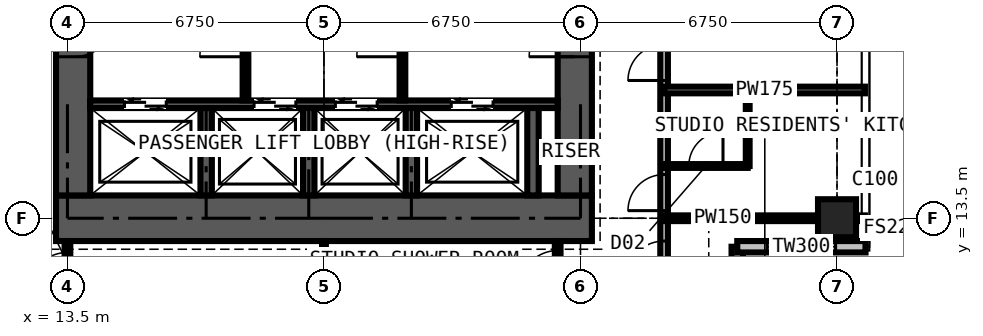
"""IFC4 building model, lengths in metres.
Left out: names, types, materials, properties, quantities, classifications, styles, units other than length and angle.
Written with IfcOpenShell. Run it as: python <this file> out.ifc"""

import sys

from ifc_helpers import new_model, si_unit, direction, frame, frame_2d, origin, origin_2d, place, context, subcontext, project, spatial, rectangle, extrude, element, fill, save


model = new_model("IFC4")
c1 = context("Model", 3, precision=1e-05, world=origin(), true_north=direction((0.0, 1.0)))
c2 = subcontext(c1, "Body", "Model", "MODEL_VIEW")
j1 = project(units=[si_unit("LENGTHUNIT", "METRE"), si_unit("PLANEANGLEUNIT", "RADIAN")], contexts=[c1])
p1 = place(None, origin())
s1 = spatial("IfcSite", under=j1, at=p1, CompositionType="ELEMENT")
p2 = place(p1, origin())
s2 = spatial("IfcBuilding", under=s1, at=p2, CompositionType="ELEMENT")
p3 = place(p2, frame((0.0, 0.0, 247.5)))
s3 = spatial("IfcBuildingStorey", under=s2, at=p3, CompositionType="ELEMENT", Elevation=247.5)
p4 = place(p3, frame((33.75, 13.5, 0.0), z_axis=(0.0, 0.0, 1.0), x_axis=(1.0, 0.0, 0.0)))
e1 = element("IfcColumn", 1, at=p4, inside=s3, PredefinedType="COLUMN", context=c2, shape_type="SweptSolid", body=[
    extrude(rectangle(XDim=1.0, YDim=1.0, at=origin_2d()), origin(), (0.0, 0.0, 1.0), 3.6),
])
p5 = place(p3, frame((13.2, 13.5, 0.0), z_axis=(0.0, 0.0, 1.0), x_axis=(1.0, 0.0, 0.0)))
e2 = element("IfcWall", 2, at=p5, inside=s3, PredefinedType="SHEAR", context=c2, shape_type="SweptSolid", body=[
    extrude(rectangle(XDim=14.1, YDim=1.2, at=frame_2d((7.05, 0.0))), origin(), (0.0, 0.0, 1.0), 3.6),
])
p6 = place(p3, frame((26.85, 14.1, 0.0), z_axis=(0.0, 0.0, 1.0), x_axis=(0.0, 1.0, 0.0)))
e3 = element("IfcWall", 3, at=p6, inside=s3, PredefinedType="SHEAR", context=c2, shape_type="SweptSolid", body=[
    extrude(rectangle(XDim=12.3, YDim=0.9, at=frame_2d((6.15, 0.0))), origin(), (0.0, 0.0, 1.0), 3.6),
])
p7 = place(p6, frame((3.65, 0.0, 0.0)))
e4 = element("IfcOpeningElement", 4, at=p7, cuts=e3, PredefinedType="OPENING", context=c2, shape_type="SweptSolid", body=[
    extrude(rectangle(XDim=1.2, YDim=2.2, at=frame_2d((0.6, 1.1))), frame((0.0, 0.46, 0.0), z_axis=(0.0, -1.0, 0.0), x_axis=(1.0, 0.0, 0.0)), (0.0, 0.0, 1.0), 0.92),
])
p8 = place(p3, frame((13.65, 26.4, 0.0), z_axis=(0.0, 0.0, 1.0), x_axis=(0.0, -1.0, 0.0)))
e5 = element("IfcWall", 5, at=p8, inside=s3, PredefinedType="SHEAR", context=c2, shape_type="SweptSolid", body=[
    extrude(rectangle(XDim=12.3, YDim=0.9, at=frame_2d((6.15, 0.0))), origin(), (0.0, 0.0, 1.0), 3.6),
])
p9 = place(p8, frame((7.45, 0.0, 0.0)))
e6 = element("IfcOpeningElement", 6, at=p9, cuts=e5, PredefinedType="OPENING", context=c2, shape_type="SweptSolid", body=[
    extrude(rectangle(XDim=1.2, YDim=2.2, at=frame_2d((0.6, 1.1))), frame((0.0, 0.46, 0.0), z_axis=(0.0, -1.0, 0.0), x_axis=(1.0, 0.0, 0.0)), (0.0, 0.0, 1.0), 0.92),
])
p10 = place(p3, frame((31.125, 9.375, 0.0), z_axis=(0.0, 0.0, 1.0), x_axis=(0.0, 1.0, 0.0)))
e7 = element("IfcWall", 7, at=p10, inside=s3, PredefinedType="SOLIDWALL", context=c2, shape_type="SweptSolid", body=[
    extrude(rectangle(XDim=3.375, YDim=0.3, at=frame_2d((1.688, 0.0))), origin(), (0.0, 0.0, 1.0), 3.375),
])
p11 = place(p10, frame((0.788, 0.0, 0.6)))
e8 = element("IfcOpeningElement", 8, at=p11, cuts=e7, PredefinedType="OPENING", context=c2, shape_type="SweptSolid", body=[
    extrude(rectangle(XDim=1.8, YDim=2.1, at=frame_2d((0.9, 1.05))), frame((0.0, 0.16, 0.0), z_axis=(0.0, -1.0, 0.0), x_axis=(1.0, 0.0, 0.0)), (0.0, 0.0, 1.0), 0.32),
])
p12 = place(p3, frame((31.125, 12.75, 0.0), z_axis=(0.0, 0.0, 1.0), x_axis=(1.0, 0.0, 0.0)))
e9 = element("IfcWall", 9, at=p12, inside=s3, PredefinedType="SOLIDWALL", context=c2, shape_type="SweptSolid", body=[
    extrude(rectangle(XDim=3.375, YDim=0.3, at=frame_2d((1.688, 0.0))), origin(), (0.0, 0.0, 1.0), 3.375),
])
p13 = place(p12, frame((0.788, 0.0, 0.6)))
e10 = element("IfcOpeningElement", 10, at=p13, cuts=e9, PredefinedType="OPENING", context=c2, shape_type="SweptSolid", body=[
    extrude(rectangle(XDim=1.8, YDim=2.1, at=frame_2d((0.9, 1.05))), frame((0.0, 0.16, 0.0), z_axis=(0.0, -1.0, 0.0), x_axis=(1.0, 0.0, 0.0)), (0.0, 0.0, 1.0), 0.32),
])
p14 = place(p3, frame((14.1, 16.5, 0.0), z_axis=(0.0, 0.0, 1.0), x_axis=(1.0, 0.0, 0.0)))
e11 = element("IfcWall", 11, at=p14, inside=s3, PredefinedType="SHEAR", context=c2, shape_type="SweptSolid", body=[
    extrude(rectangle(XDim=12.3, YDim=0.2, at=frame_2d((6.15, 0.0))), origin(), (0.0, 0.0, 1.0), 3.6),
])
p15 = place(p14, frame((0.9, 0.0, 0.0)))
e12 = element("IfcOpeningElement", 12, at=p15, cuts=e11, PredefinedType="OPENING", context=c2, shape_type="SweptSolid", body=[
    extrude(rectangle(XDim=1.1, YDim=2.2, at=frame_2d((0.55, 1.1))), frame((0.0, 0.11, 0.0), z_axis=(0.0, -1.0, 0.0), x_axis=(1.0, 0.0, 0.0)), (0.0, 0.0, 1.0), 0.22),
])
p16 = place(p14, frame((4.31, 0.0, 0.0)))
e13 = element("IfcOpeningElement", 13, at=p16, cuts=e11, PredefinedType="OPENING", context=c2, shape_type="SweptSolid", body=[
    extrude(rectangle(XDim=1.1, YDim=2.2, at=frame_2d((0.55, 1.1))), frame((0.0, 0.11, 0.0), z_axis=(0.0, -1.0, 0.0), x_axis=(1.0, 0.0, 0.0)), (0.0, 0.0, 1.0), 0.22),
])
p17 = place(p14, frame((6.45, 0.0, 0.0)))
e14 = element("IfcOpeningElement", 14, at=p17, cuts=e11, PredefinedType="OPENING", context=c2, shape_type="SweptSolid", body=[
    extrude(rectangle(XDim=1.1, YDim=2.2, at=frame_2d((0.55, 1.1))), frame((0.0, 0.11, 0.0), z_axis=(0.0, -1.0, 0.0), x_axis=(1.0, 0.0, 0.0)), (0.0, 0.0, 1.0), 0.22),
])
p18 = place(p14, frame((9.5, 0.0, 0.0)))
e15 = element("IfcOpeningElement", 15, at=p18, cuts=e11, PredefinedType="OPENING", context=c2, shape_type="SweptSolid", body=[
    extrude(rectangle(XDim=1.1, YDim=2.2, at=frame_2d((0.55, 1.1))), frame((0.0, 0.11, 0.0), z_axis=(0.0, -1.0, 0.0), x_axis=(1.0, 0.0, 0.0)), (0.0, 0.0, 1.0), 0.22),
])
for number, where, z_axis, x_axis in (
    (16, (17.15, 14.1, 0.0), (0.0, 0.0, 1.0), (0.0, 1.0, 0.0)),
    (17, (19.85, 14.1, 0.0), (0.0, 0.0, 1.0), (0.0, 1.0, 0.0)),
    (18, (22.55, 14.1, 0.0), (0.0, 0.0, 1.0), (0.0, 1.0, 0.0)),
    (19, (25.75, 14.1, 0.0), (0.0, 0.0, 1.0), (0.0, 1.0, 0.0)),
):
    element("IfcWall", number, at=place(p3, frame(where, z_axis=z_axis, x_axis=x_axis)), inside=s3, PredefinedType="SHEAR", context=c2, shape_type="SweptSolid", body=[
        extrude(rectangle(XDim=2.3, YDim=0.3, at=frame_2d((1.15, 0.0))), origin(), (0.0, 0.0, 1.0), 3.6),
    ])
p19 = place(p3, frame((18.185, 16.6, 0.0), z_axis=(0.0, 0.0, 1.0), x_axis=(0.0, 1.0, 0.0)))
e20 = element("IfcWall", 20, at=p19, inside=s3, PredefinedType="PARTITIONING", context=c2, shape_type="SweptSolid", body=[
    extrude(rectangle(XDim=3.5, YDim=0.15, at=frame_2d((1.75, 0.0))), origin(), (0.0, 0.0, 1.0), 3.375),
])
p20 = place(p19, frame((1.15, 0.0, 0.0)))
e21 = element("IfcOpeningElement", 21, at=p20, cuts=e20, PredefinedType="OPENING", context=c2, shape_type="SweptSolid", body=[
    extrude(rectangle(XDim=1.2, YDim=2.2, at=frame_2d((0.6, 1.1))), frame((0.0, 0.085, 0.0), z_axis=(0.0, -1.0, 0.0), x_axis=(1.0, 0.0, 0.0)), (0.0, 0.0, 1.0), 0.17),
])
p21 = place(p3, frame((22.315, 16.6, 0.0), z_axis=(0.0, 0.0, 1.0), x_axis=(0.0, 1.0, 0.0)))
e22 = element("IfcWall", 22, at=p21, inside=s3, PredefinedType="PARTITIONING", context=c2, shape_type="SweptSolid", body=[
    extrude(rectangle(XDim=3.5, YDim=0.15, at=frame_2d((1.75, 0.0))), origin(), (0.0, 0.0, 1.0), 3.375),
])
p22 = place(p21, frame((1.15, 0.0, 0.0)))
e23 = element("IfcOpeningElement", 23, at=p22, cuts=e22, PredefinedType="OPENING", context=c2, shape_type="SweptSolid", body=[
    extrude(rectangle(XDim=1.2, YDim=2.2, at=frame_2d((0.6, 1.1))), frame((0.0, 0.085, 0.0), z_axis=(0.0, -1.0, 0.0), x_axis=(1.0, 0.0, 0.0)), (0.0, 0.0, 1.0), 0.17),
])
p23 = place(p3, frame((13.5, 6.016, 0.0), z_axis=(0.0, 0.0, 1.0), x_axis=(0.0, 1.0, 0.0)))
e24 = element("IfcWall", 24, at=p23, inside=s3, PredefinedType="PARTITIONING", context=c2, shape_type="SweptSolid", body=[
    extrude(rectangle(XDim=6.884, YDim=0.15, at=frame_2d((3.442, 0.0))), origin(), (0.0, 0.0, 1.0), 2.61),
])
p24 = place(p23, frame((5.584, 0.0, 0.0)))
e25 = element("IfcOpeningElement", 25, at=p24, cuts=e24, PredefinedType="OPENING", context=c2, shape_type="SweptSolid", body=[
    extrude(rectangle(XDim=1.0, YDim=2.2, at=frame_2d((0.5, 1.1))), frame((0.0, 0.085, 0.0), z_axis=(0.0, -1.0, 0.0), x_axis=(1.0, 0.0, 0.0)), (0.0, 0.0, 1.0), 0.17),
])
p25 = place(p3, frame((20.25, 6.016, 0.0), z_axis=(0.0, 0.0, 1.0), x_axis=(0.0, 1.0, 0.0)))
e26 = element("IfcWall", 26, at=p25, inside=s3, PredefinedType="PARTITIONING", context=c2, shape_type="SweptSolid", body=[
    extrude(rectangle(XDim=6.884, YDim=0.1, at=frame_2d((3.442, 0.0))), origin(), (0.0, 0.0, 1.0), 2.61),
])
p26 = place(p3, frame((26.4, 11.3, 0.0), z_axis=(0.0, 0.0, 1.0), x_axis=(0.0, 1.0, 0.0)))
e27 = element("IfcWall", 27, at=p26, inside=s3, PredefinedType="PARTITIONING", context=c2, shape_type="SweptSolid", body=[
    extrude(rectangle(XDim=1.6, YDim=0.15, at=frame_2d((0.8, 0.0))), origin(), (0.0, 0.0, 1.0), 3.375),
])
p27 = place(p26, frame((0.35, 0.0, 0.0)))
e28 = element("IfcOpeningElement", 28, at=p27, cuts=e27, PredefinedType="OPENING", context=c2, shape_type="SweptSolid", body=[
    extrude(rectangle(XDim=1.0, YDim=2.2, at=frame_2d((0.5, 1.1))), frame((0.0, 0.085, 0.0), z_axis=(0.0, -1.0, 0.0), x_axis=(1.0, 0.0, 0.0)), (0.0, 0.0, 1.0), 0.17),
])
p28 = place(p3, frame((29.2, 11.3, 0.0), z_axis=(0.0, 0.0, 1.0), x_axis=(0.0, 1.0, 0.0)))
e29 = element("IfcWall", 29, at=p28, inside=s3, PredefinedType="PARTITIONING", context=c2, shape_type="SweptSolid", body=[
    extrude(rectangle(XDim=17.9, YDim=0.2, at=frame_2d((8.95, 0.0))), origin(), (0.0, 0.0, 1.0), 3.375),
])
p29 = place(p28, frame((0.6, 0.0, 0.0)))
e30 = element("IfcOpeningElement", 30, at=p29, cuts=e29, PredefinedType="OPENING", context=c2, shape_type="SweptSolid", body=[
    extrude(rectangle(XDim=1.0, YDim=2.2, at=frame_2d((0.5, 1.1))), frame((0.0, 0.11, 0.0), z_axis=(0.0, -1.0, 0.0), x_axis=(1.0, 0.0, 0.0)), (0.0, 0.0, 1.0), 0.22),
])
p30 = place(p28, frame((2.4, 0.0, 0.0)))
e31 = element("IfcOpeningElement", 31, at=p30, cuts=e29, PredefinedType="OPENING", context=c2, shape_type="SweptSolid", body=[
    extrude(rectangle(XDim=0.95, YDim=2.2, at=frame_2d((0.475, 1.1))), frame((0.0, 0.11, 0.0), z_axis=(0.0, -1.0, 0.0), x_axis=(1.0, 0.0, 0.0)), (0.0, 0.0, 1.0), 0.22),
])
p31 = place(p28, frame((5.825, 0.0, 0.0)))
e32 = element("IfcOpeningElement", 32, at=p31, cuts=e29, PredefinedType="OPENING", context=c2, shape_type="SweptSolid", body=[
    extrude(rectangle(XDim=0.95, YDim=2.2, at=frame_2d((0.475, 1.1))), frame((0.0, 0.11, 0.0), z_axis=(0.0, -1.0, 0.0), x_axis=(1.0, 0.0, 0.0)), (0.0, 0.0, 1.0), 0.22),
])
p32 = place(p28, frame((9.2, 0.0, 0.0)))
e33 = element("IfcOpeningElement", 33, at=p32, cuts=e29, PredefinedType="OPENING", context=c2, shape_type="SweptSolid", body=[
    extrude(rectangle(XDim=0.95, YDim=2.2, at=frame_2d((0.475, 1.1))), frame((0.0, 0.11, 0.0), z_axis=(0.0, -1.0, 0.0), x_axis=(1.0, 0.0, 0.0)), (0.0, 0.0, 1.0), 0.22),
])
p33 = place(p28, frame((12.575, 0.0, 0.0)))
e34 = element("IfcOpeningElement", 34, at=p33, cuts=e29, PredefinedType="OPENING", context=c2, shape_type="SweptSolid", body=[
    extrude(rectangle(XDim=0.95, YDim=2.2, at=frame_2d((0.475, 1.1))), frame((0.0, 0.11, 0.0), z_axis=(0.0, -1.0, 0.0), x_axis=(1.0, 0.0, 0.0)), (0.0, 0.0, 1.0), 0.22),
])
p34 = place(p28, frame((16.3, 0.0, 0.0)))
e35 = element("IfcOpeningElement", 35, at=p34, cuts=e29, PredefinedType="OPENING", context=c2, shape_type="SweptSolid", body=[
    extrude(rectangle(XDim=1.0, YDim=2.2, at=frame_2d((0.5, 1.1))), frame((0.0, 0.11, 0.0), z_axis=(0.0, -1.0, 0.0), x_axis=(1.0, 0.0, 0.0)), (0.0, 0.0, 1.0), 0.22),
])
p35 = place(p3, frame((29.2, 13.5, 0.0), z_axis=(0.0, 0.0, 1.0), x_axis=(1.0, 0.0, 0.0)))
e36 = element("IfcWall", 36, at=p35, inside=s3, PredefinedType="PARTITIONING", context=c2, shape_type="SweptSolid", body=[
    extrude(rectangle(XDim=5.284, YDim=0.15, at=frame_2d((2.642, 0.0))), origin(), (0.0, 0.0, 1.0), 2.877),
])
p36 = place(p3, frame((29.2, 14.875, 0.0), z_axis=(0.0, 0.0, 1.0), x_axis=(1.0, 0.0, 0.0)))
e37 = element("IfcWall", 37, at=p36, inside=s3, PredefinedType="PARTITIONING", context=c2, shape_type="SweptSolid", body=[
    extrude(rectangle(XDim=2.2, YDim=0.1, at=frame_2d((1.1, 0.0))), origin(), (0.0, 0.0, 1.0), 3.375),
])
p37 = place(p36, frame((0.65, 0.0, 0.0)))
e38 = element("IfcOpeningElement", 38, at=p37, cuts=e37, PredefinedType="OPENING", context=c2, shape_type="SweptSolid", body=[
    extrude(rectangle(XDim=0.9, YDim=2.2, at=frame_2d((0.45, 1.1))), frame((0.0, 0.06, 0.0), z_axis=(0.0, -1.0, 0.0), x_axis=(1.0, 0.0, 0.0)), (0.0, 0.0, 1.0), 0.12),
])
p38 = place(p3, frame((29.2, 16.875, 0.0), z_axis=(0.0, 0.0, 1.0), x_axis=(1.0, 0.0, 0.0)))
e39 = element("IfcWall", 39, at=p38, inside=s3, PredefinedType="PARTITIONING", context=c2, shape_type="SweptSolid", body=[
    extrude(rectangle(XDim=5.284, YDim=0.175, at=frame_2d((2.642, 0.0))), origin(), (0.0, 0.0, 1.0), 3.375),
])
p39 = place(p3, frame((31.4, 14.875, 0.0), z_axis=(0.0, 0.0, 1.0), x_axis=(0.0, 1.0, 0.0)))
e40 = element("IfcWall", 40, at=p39, inside=s3, PredefinedType="PARTITIONING", context=c2, shape_type="SweptSolid", body=[
    extrude(rectangle(XDim=2.0, YDim=0.1, at=frame_2d((1.0, 0.0))), origin(), (0.0, 0.0, 1.0), 3.375),
])
p40 = place(p13, origin())
e41 = element("IfcWindow", 41, at=p40, inside=s3, PartitioningType="SINGLE_PANEL", PredefinedType="WINDOW", context=c2, shape_type="SweptSolid", body=[
    extrude(rectangle(XDim=1.8, YDim=2.1, at=frame_2d((0.9, 1.05))), frame((0.0, 0.03, 0.0), z_axis=(0.0, -1.0, 0.0), x_axis=(1.0, 0.0, 0.0)), (0.0, 0.0, 1.0), 0.06),
])
fill(e10, e41)
p41 = place(p15, origin())
e42 = element("IfcDoor", 42, at=p41, inside=s3, OperationType="DOUBLE_DOOR_SLIDING", PredefinedType="DOOR", context=c2, shape_type="SweptSolid", body=[
    extrude(rectangle(XDim=1.1, YDim=2.2, at=frame_2d((0.55, 1.1))), frame((0.0, 0.025, 0.0), z_axis=(0.0, -1.0, 0.0), x_axis=(1.0, 0.0, 0.0)), (0.0, 0.0, 1.0), 0.05),
])
fill(e12, e42)
p42 = place(p16, origin())
e43 = element("IfcDoor", 43, at=p42, inside=s3, OperationType="DOUBLE_DOOR_SLIDING", PredefinedType="DOOR", context=c2, shape_type="SweptSolid", body=[
    extrude(rectangle(XDim=1.1, YDim=2.2, at=frame_2d((0.55, 1.1))), frame((0.0, 0.025, 0.0), z_axis=(0.0, -1.0, 0.0), x_axis=(1.0, 0.0, 0.0)), (0.0, 0.0, 1.0), 0.05),
])
fill(e13, e43)
p43 = place(p17, origin())
e44 = element("IfcDoor", 44, at=p43, inside=s3, OperationType="DOUBLE_DOOR_SLIDING", PredefinedType="DOOR", context=c2, shape_type="SweptSolid", body=[
    extrude(rectangle(XDim=1.1, YDim=2.2, at=frame_2d((0.55, 1.1))), frame((0.0, 0.025, 0.0), z_axis=(0.0, -1.0, 0.0), x_axis=(1.0, 0.0, 0.0)), (0.0, 0.0, 1.0), 0.05),
])
fill(e14, e44)
p44 = place(p18, origin())
e45 = element("IfcDoor", 45, at=p44, inside=s3, OperationType="DOUBLE_DOOR_SLIDING", PredefinedType="DOOR", context=c2, shape_type="SweptSolid", body=[
    extrude(rectangle(XDim=1.1, YDim=2.2, at=frame_2d((0.55, 1.1))), frame((0.0, 0.025, 0.0), z_axis=(0.0, -1.0, 0.0), x_axis=(1.0, 0.0, 0.0)), (0.0, 0.0, 1.0), 0.05),
])
fill(e15, e45)
p45 = place(p9, origin())
e46 = element("IfcDoor", 46, at=p45, inside=s3, OperationType="DOUBLE_DOOR_SINGLE_SWING", PredefinedType="DOOR", context=c2, shape_type="SweptSolid", body=[
    extrude(rectangle(XDim=1.2, YDim=2.2, at=frame_2d((0.6, 1.1))), frame((0.0, 0.025, 0.0), z_axis=(0.0, -1.0, 0.0), x_axis=(1.0, 0.0, 0.0)), (0.0, 0.0, 1.0), 0.05),
])
fill(e6, e46)
p46 = place(p7, origin())
e47 = element("IfcDoor", 47, at=p46, inside=s3, OperationType="DOUBLE_DOOR_SINGLE_SWING", PredefinedType="DOOR", context=c2, shape_type="SweptSolid", body=[
    extrude(rectangle(XDim=1.2, YDim=2.2, at=frame_2d((0.6, 1.1))), frame((0.0, 0.025, 0.0), z_axis=(0.0, -1.0, 0.0), x_axis=(1.0, 0.0, 0.0)), (0.0, 0.0, 1.0), 0.05),
])
fill(e4, e47)
p47 = place(p20, origin())
e48 = element("IfcDoor", 48, at=p47, inside=s3, OperationType="DOUBLE_DOOR_SINGLE_SWING", PredefinedType="DOOR", context=c2, shape_type="SweptSolid", body=[
    extrude(rectangle(XDim=1.2, YDim=2.2, at=frame_2d((0.6, 1.1))), frame((0.0, 0.025, 0.0), z_axis=(0.0, -1.0, 0.0), x_axis=(1.0, 0.0, 0.0)), (0.0, 0.0, 1.0), 0.05),
])
fill(e21, e48)
p48 = place(p22, origin())
e49 = element("IfcDoor", 49, at=p48, inside=s3, OperationType="DOUBLE_DOOR_SINGLE_SWING", PredefinedType="DOOR", context=c2, shape_type="SweptSolid", body=[
    extrude(rectangle(XDim=1.2, YDim=2.2, at=frame_2d((0.6, 1.1))), frame((0.0, 0.025, 0.0), z_axis=(0.0, -1.0, 0.0), x_axis=(1.0, 0.0, 0.0)), (0.0, 0.0, 1.0), 0.05),
])
fill(e23, e49)
p49 = place(p24, origin())
e50 = element("IfcDoor", 50, at=p49, inside=s3, OperationType="SINGLE_SWING_LEFT", PredefinedType="DOOR", context=c2, shape_type="SweptSolid", body=[
    extrude(rectangle(XDim=1.0, YDim=2.2, at=frame_2d((0.5, 1.1))), frame((0.0, 0.025, 0.0), z_axis=(0.0, -1.0, 0.0), x_axis=(1.0, 0.0, 0.0)), (0.0, 0.0, 1.0), 0.05),
])
fill(e25, e50)
p50 = place(p27, origin())
e51 = element("IfcDoor", 51, at=p50, inside=s3, OperationType="SINGLE_SWING_LEFT", PredefinedType="DOOR", context=c2, shape_type="SweptSolid", body=[
    extrude(rectangle(XDim=1.0, YDim=2.2, at=frame_2d((0.5, 1.1))), frame((0.0, 0.025, 0.0), z_axis=(0.0, -1.0, 0.0), x_axis=(1.0, 0.0, 0.0)), (0.0, 0.0, 1.0), 0.05),
])
fill(e28, e51)
p51 = place(p29, origin())
e52 = element("IfcDoor", 52, at=p51, inside=s3, OperationType="SINGLE_SWING_LEFT", PredefinedType="DOOR", context=c2, shape_type="SweptSolid", body=[
    extrude(rectangle(XDim=1.0, YDim=2.2, at=frame_2d((0.5, 1.1))), frame((0.0, 0.025, 0.0), z_axis=(0.0, -1.0, 0.0), x_axis=(1.0, 0.0, 0.0)), (0.0, 0.0, 1.0), 0.05),
])
fill(e30, e52)
p52 = place(p30, origin())
e53 = element("IfcDoor", 53, at=p52, inside=s3, OperationType="SINGLE_SWING_LEFT", PredefinedType="DOOR", context=c2, shape_type="SweptSolid", body=[
    extrude(rectangle(XDim=0.95, YDim=2.2, at=frame_2d((0.475, 1.1))), frame((0.0, 0.025, 0.0), z_axis=(0.0, -1.0, 0.0), x_axis=(1.0, 0.0, 0.0)), (0.0, 0.0, 1.0), 0.05),
])
fill(e31, e53)
p53 = place(p37, origin())
e54 = element("IfcDoor", 54, at=p53, inside=s3, OperationType="SINGLE_SWING_RIGHT", PredefinedType="DOOR", context=c2, shape_type="SweptSolid", body=[
    extrude(rectangle(XDim=0.9, YDim=2.2, at=frame_2d((0.45, 1.1))), frame((0.0, 0.025, 0.0), z_axis=(0.0, -1.0, 0.0), x_axis=(1.0, 0.0, 0.0)), (0.0, 0.0, 1.0), 0.05),
])
fill(e38, e54)
p54 = place(p31, origin())
e55 = element("IfcDoor", 55, at=p54, inside=s3, OperationType="SINGLE_SWING_LEFT", PredefinedType="DOOR", context=c2, shape_type="SweptSolid", body=[
    extrude(rectangle(XDim=0.95, YDim=2.2, at=frame_2d((0.475, 1.1))), frame((0.0, 0.025, 0.0), z_axis=(0.0, -1.0, 0.0), x_axis=(1.0, 0.0, 0.0)), (0.0, 0.0, 1.0), 0.05),
])
fill(e32, e55)
save(model, sys.argv[1])
